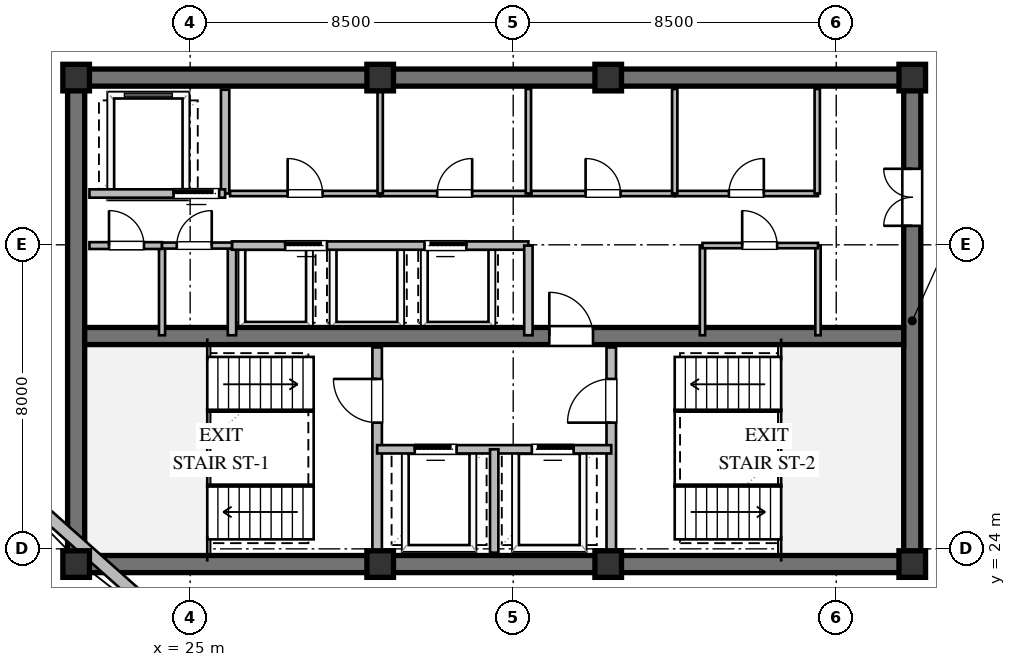
"""IFC4 building model, lengths in metres.
Left out: names, types, materials, properties, quantities, classifications, styles, units other than length and angle.
Written with IfcOpenShell. Run it as: python <this file> out.ifc"""

import sys

from ifc_helpers import new_model, si_unit, direction, frame, frame_2d, origin, origin_2d, place, context, subcontext, project, spatial, rectangle, extrude, element, fill, save


model = new_model("IFC4")
c1 = context("Model", 3, precision=1e-05, world=origin(), true_north=direction((0.0, 1.0)))
c2 = subcontext(c1, "Body", "Model", "MODEL_VIEW")
j1 = project(units=[si_unit("LENGTHUNIT", "METRE"), si_unit("PLANEANGLEUNIT", "RADIAN")], contexts=[c1])
p1 = place(None, origin())
s1 = spatial("IfcSite", under=j1, at=p1, CompositionType="ELEMENT")
p2 = place(p1, origin())
s2 = spatial("IfcBuilding", under=s1, at=p2, CompositionType="ELEMENT")
p3 = place(p2, frame((0.0, 0.0, 281.4)))
s3 = spatial("IfcBuildingStorey", under=s2, at=p3, CompositionType="ELEMENT", Elevation=281.4)
for number, where, z_axis, x_axis in (
    (1, (21.775, 23.6, 0.0), (0.0, 0.0, 1.0), (1.0, 0.0, 0.0)),
    (2, (21.775, 36.4, 0.0), (0.0, 0.0, 1.0), (1.0, 0.0, 0.0)),
):
    element("IfcWall", number, at=place(p3, frame(where, z_axis=z_axis, x_axis=x_axis)), inside=s3, PredefinedType="SHEAR", context=c2, shape_type="SweptSolid", body=[
        extrude(rectangle(XDim=22.45, YDim=0.45, at=frame_2d((11.225, 0.0))), origin(), (0.0, 0.0, 1.0), 3.56),
    ])
p4 = place(p3, frame((22.0, 23.825, 0.0), z_axis=(0.0, 0.0, 1.0), x_axis=(0.0, 1.0, 0.0)))
e3 = element("IfcWall", 3, at=p4, inside=s3, PredefinedType="SHEAR", context=c2, shape_type="SweptSolid", body=[
    extrude(rectangle(XDim=12.35, YDim=0.45, at=frame_2d((6.175, 0.0))), origin(), (0.0, 0.0, 1.0), 3.56),
])
p5 = place(p3, frame((44.0, 23.825, 0.0), z_axis=(0.0, 0.0, 1.0), x_axis=(0.0, 1.0, 0.0)))
e4 = element("IfcWall", 4, at=p5, inside=s3, PredefinedType="SHEAR", context=c2, shape_type="SweptSolid", body=[
    extrude(rectangle(XDim=12.35, YDim=0.45, at=frame_2d((6.175, 0.0))), origin(), (0.0, 0.0, 1.0), 3.56),
])
p6 = place(p5, frame((8.675, 0.0, 0.0)))
e5 = element("IfcOpeningElement", 5, at=p6, cuts=e4, PredefinedType="OPENING", context=c2, shape_type="SweptSolid", body=[
    extrude(rectangle(XDim=1.5, YDim=2.15, at=frame_2d((0.75, 1.075))), frame((0.0, 0.235, 0.0), z_axis=(0.0, -1.0, 0.0), x_axis=(1.0, 0.0, 0.0)), (0.0, 0.0, 1.0), 0.47),
])
p7 = place(p3, frame((22.225, 29.6, 0.0), z_axis=(0.0, 0.0, 1.0), x_axis=(1.0, 0.0, 0.0)))
e6 = element("IfcWall", 6, at=p7, inside=s3, PredefinedType="SHEAR", context=c2, shape_type="SweptSolid", body=[
    extrude(rectangle(XDim=21.55, YDim=0.45, at=frame_2d((10.775, 0.0))), origin(), (0.0, 0.0, 1.0), 3.56),
])
p8 = place(p7, frame((12.225, 0.0, 0.0)))
e7 = element("IfcOpeningElement", 7, at=p8, cuts=e6, PredefinedType="OPENING", context=c2, shape_type="SweptSolid", body=[
    extrude(rectangle(XDim=1.15, YDim=2.1, at=frame_2d((0.575, 1.05))), frame((0.0, 0.235, 0.0), z_axis=(0.0, -1.0, 0.0), x_axis=(1.0, 0.0, 0.0)), (0.0, 0.0, 1.0), 0.47),
])
for number, where, z_axis, x_axis in (
    (8, (22.0, 23.6, 0.0), (0.0, 0.0, 1.0), (1.0, 0.0, 0.0)),
    (9, (30.0, 23.6, 0.0), (0.0, 0.0, 1.0), (1.0, 0.0, 0.0)),
    (10, (36.0, 23.6, 0.0), (0.0, 0.0, 1.0), (1.0, 0.0, 0.0)),
    (11, (44.0, 23.6, 0.0), (0.0, 0.0, 1.0), (1.0, 0.0, 0.0)),
    (12, (44.0, 36.4, 0.0), (0.0, 0.0, 1.0), (1.0, 0.0, 0.0)),
    (13, (36.0, 36.4, 0.0), (0.0, 0.0, 1.0), (1.0, 0.0, 0.0)),
    (14, (30.0, 36.4, 0.0), (0.0, 0.0, 1.0), (1.0, 0.0, 0.0)),
    (15, (22.0, 36.4, 0.0), (0.0, 0.0, 1.0), (1.0, 0.0, 0.0)),
):
    element("IfcColumn", number, at=place(p3, frame(where, z_axis=z_axis, x_axis=x_axis)), inside=s3, PredefinedType="COLUMN", context=c2, shape_type="SweptSolid", body=[
        extrude(rectangle(XDim=0.7, YDim=0.7, at=origin_2d()), origin(), (0.0, 0.0, 1.0), 3.8),
    ])
p9 = place(p3, frame((24.648, 21.849, 0.0), z_axis=(0.0, 0.0, 1.0), x_axis=(-0.747068410291, 0.664747162721, 0.0)))
e16 = element("IfcWall", 16, at=p9, inside=s3, PredefinedType="STANDARD", context=c2, shape_type="SweptSolid", body=[
    extrude(rectangle(XDim=5.928, YDim=0.32, at=frame_2d((2.964, 0.0))), origin(), (0.0, 0.0, 1.0), 2.35),
])
p10 = place(p3, frame((29.92, 23.9, 0.0), z_axis=(0.0, 0.0, 1.0), x_axis=(0.0, 1.0, 0.0)))
e17 = element("IfcWall", 17, at=p10, inside=s3, PredefinedType="SOLIDWALL", context=c2, shape_type="SweptSolid", body=[
    extrude(rectangle(XDim=5.4, YDim=0.25, at=frame_2d((2.7, 0.0))), origin(), (0.0, 0.0, 1.0), 3.006),
])
p11 = place(p10, frame((3.421, 0.0, 0.0)))
e18 = element("IfcOpeningElement", 18, at=p11, cuts=e17, PredefinedType="OPENING", context=c2, shape_type="SweptSolid", body=[
    extrude(rectangle(XDim=1.15, YDim=2.1, at=frame_2d((0.575, 1.05))), frame((0.0, 0.135, 0.0), z_axis=(0.0, -1.0, 0.0), x_axis=(1.0, 0.0, 0.0)), (0.0, 0.0, 1.0), 0.27),
])
p12 = place(p3, frame((36.08, 23.9, 0.0), z_axis=(0.0, 0.0, 1.0), x_axis=(0.0, 1.0, 0.0)))
e19 = element("IfcWall", 19, at=p12, inside=s3, PredefinedType="SOLIDWALL", context=c2, shape_type="SweptSolid", body=[
    extrude(rectangle(XDim=5.4, YDim=0.25, at=frame_2d((2.7, 0.0))), origin(), (0.0, 0.0, 1.0), 3.56),
])
p13 = place(p12, frame((3.421, 0.0, 0.0)))
e20 = element("IfcOpeningElement", 20, at=p13, cuts=e19, PredefinedType="OPENING", context=c2, shape_type="SweptSolid", body=[
    extrude(rectangle(XDim=1.15, YDim=2.1, at=frame_2d((0.575, 1.05))), frame((0.0, 0.135, 0.0), z_axis=(0.0, -1.0, 0.0), x_axis=(1.0, 0.0, 0.0)), (0.0, 0.0, 1.0), 0.27),
])
p14 = place(p3, frame((29.92, 26.62, 0.0), z_axis=(0.0, 0.0, 1.0), x_axis=(1.0, 0.0, 0.0)))
e21 = element("IfcWall", 21, at=p14, inside=s3, PredefinedType="SOLIDWALL", context=c2, shape_type="SweptSolid", body=[
    extrude(rectangle(XDim=6.16, YDim=0.22, at=frame_2d((3.08, 0.0))), origin(), (0.0, 0.0, 1.0), 3.56),
])
p15 = place(p14, frame((0.99, 0.0, 0.0)))
e22 = element("IfcOpeningElement", 22, at=p15, cuts=e21, PredefinedType="OPENING", context=c2, shape_type="SweptSolid", body=[
    extrude(rectangle(XDim=1.1, YDim=2.1, at=frame_2d((0.55, 1.05))), frame((0.0, 0.12, 0.0), z_axis=(0.0, -1.0, 0.0), x_axis=(1.0, 0.0, 0.0)), (0.0, 0.0, 1.0), 0.24),
])
p16 = place(p14, frame((4.07, 0.0, 0.0)))
e23 = element("IfcOpeningElement", 23, at=p16, cuts=e21, PredefinedType="OPENING", context=c2, shape_type="SweptSolid", body=[
    extrude(rectangle(XDim=1.1, YDim=2.1, at=frame_2d((0.55, 1.05))), frame((0.0, 0.12, 0.0), z_axis=(0.0, -1.0, 0.0), x_axis=(1.0, 0.0, 0.0)), (0.0, 0.0, 1.0), 0.24),
])
p17 = place(p3, frame((33.0, 23.9, 0.0), z_axis=(0.0, 0.0, 1.0), x_axis=(0.0, 1.0, 0.0)))
e24 = element("IfcWall", 24, at=p17, inside=s3, PredefinedType="SOLIDWALL", context=c2, shape_type="SweptSolid", body=[
    extrude(rectangle(XDim=2.72, YDim=0.22, at=frame_2d((1.36, 0.0))), origin(), (0.0, 0.0, 1.0), 3.56),
])
p18 = place(p3, frame((25.92, 33.35, 0.0), z_axis=(0.0, 0.0, 1.0), x_axis=(0.0, 1.0, 0.0)))
e25 = element("IfcWall", 25, at=p18, inside=s3, PredefinedType="SOLIDWALL", context=c2, shape_type="SweptSolid", body=[
    extrude(rectangle(XDim=2.73, YDim=0.22, at=frame_2d((1.365, 0.0))), origin(), (0.0, 0.0, 1.0), 3.56),
])
p19 = place(p3, frame((22.35, 33.35, 0.0), z_axis=(0.0, 0.0, 1.0), x_axis=(1.0, 0.0, 0.0)))
e26 = element("IfcWall", 26, at=p19, inside=s3, PredefinedType="SOLIDWALL", context=c2, shape_type="SweptSolid", body=[
    extrude(rectangle(XDim=3.57, YDim=0.22, at=frame_2d((1.785, 0.0))), origin(), (0.0, 0.0, 1.0), 3.56),
])
p20 = place(p19, frame((2.213, 0.0, 0.0)))
e27 = element("IfcOpeningElement", 27, at=p20, cuts=e26, PredefinedType="OPENING", context=c2, shape_type="SweptSolid", body=[
    extrude(rectangle(XDim=1.2, YDim=2.1, at=frame_2d((0.6, 1.05))), frame((0.0, 0.12, 0.0), z_axis=(0.0, -1.0, 0.0), x_axis=(1.0, 0.0, 0.0)), (0.0, 0.0, 1.0), 0.24),
])
p21 = place(p3, frame((26.1, 29.62, 0.0), z_axis=(0.0, 0.0, 1.0), x_axis=(0.0, 1.0, 0.0)))
e28 = element("IfcWall", 28, at=p21, inside=s3, PredefinedType="SOLIDWALL", context=c2, shape_type="SweptSolid", body=[
    extrude(rectangle(XDim=2.36, YDim=0.22, at=frame_2d((1.18, 0.0))), origin(), (0.0, 0.0, 1.0), 3.56),
])
p22 = place(p3, frame((26.1, 31.98, 0.0), z_axis=(0.0, 0.0, 1.0), x_axis=(1.0, 0.0, 0.0)))
e29 = element("IfcWall", 29, at=p22, inside=s3, PredefinedType="SOLIDWALL", context=c2, shape_type="SweptSolid", body=[
    extrude(rectangle(XDim=7.8, YDim=0.22, at=frame_2d((3.9, 0.0))), origin(), (0.0, 0.0, 1.0), 3.56),
])
p23 = place(p22, frame((1.4, 0.0, 0.0)))
e30 = element("IfcOpeningElement", 30, at=p23, cuts=e29, PredefinedType="OPENING", context=c2, shape_type="SweptSolid", body=[
    extrude(rectangle(XDim=1.1, YDim=2.1, at=frame_2d((0.55, 1.05))), frame((0.0, 0.12, 0.0), z_axis=(0.0, -1.0, 0.0), x_axis=(1.0, 0.0, 0.0)), (0.0, 0.0, 1.0), 0.24),
])
p24 = place(p22, frame((5.066, 0.0, 0.0)))
e31 = element("IfcOpeningElement", 31, at=p24, cuts=e29, PredefinedType="OPENING", context=c2, shape_type="SweptSolid", body=[
    extrude(rectangle(XDim=1.1, YDim=2.1, at=frame_2d((0.55, 1.05))), frame((0.0, 0.12, 0.0), z_axis=(0.0, -1.0, 0.0), x_axis=(1.0, 0.0, 0.0)), (0.0, 0.0, 1.0), 0.24),
])
p25 = place(p3, frame((33.9, 29.62, 0.0), z_axis=(0.0, 0.0, 1.0), x_axis=(0.0, 1.0, 0.0)))
e32 = element("IfcWall", 32, at=p25, inside=s3, PredefinedType="SOLIDWALL", context=c2, shape_type="SweptSolid", body=[
    extrude(rectangle(XDim=2.36, YDim=0.22, at=frame_2d((1.18, 0.0))), origin(), (0.0, 0.0, 1.0), 3.56),
])
p26 = place(p3, frame((26.05, 33.35, 0.0), z_axis=(0.0, 0.0, 1.0), x_axis=(1.0, 0.0, 0.0)))
e33 = element("IfcWall", 33, at=p26, inside=s3, PredefinedType="PARTITIONING", context=c2, shape_type="SweptSolid", body=[
    extrude(rectangle(XDim=3.95, YDim=0.14, at=frame_2d((1.975, 0.0))), origin(), (0.0, 0.0, 1.0), 3.56),
])
p27 = place(p26, frame((1.515, 0.0, 0.0)))
e34 = element("IfcOpeningElement", 34, at=p27, cuts=e33, PredefinedType="OPENING", context=c2, shape_type="SweptSolid", body=[
    extrude(rectangle(XDim=0.92, YDim=2.1, at=frame_2d((0.46, 1.05))), frame((0.0, 0.08, 0.0), z_axis=(0.0, -1.0, 0.0), x_axis=(1.0, 0.0, 0.0)), (0.0, 0.0, 1.0), 0.16),
])
p28 = place(p3, frame((30.0, 33.35, 0.0), z_axis=(0.0, 0.0, 1.0), x_axis=(1.0, 0.0, 0.0)))
e35 = element("IfcWall", 35, at=p28, inside=s3, PredefinedType="PARTITIONING", context=c2, shape_type="SweptSolid", body=[
    extrude(rectangle(XDim=3.92, YDim=0.14, at=frame_2d((1.96, 0.0))), origin(), (0.0, 0.0, 1.0), 3.56),
])
p29 = place(p28, frame((1.5, 0.0, 0.0)))
e36 = element("IfcOpeningElement", 36, at=p29, cuts=e35, PredefinedType="OPENING", context=c2, shape_type="SweptSolid", body=[
    extrude(rectangle(XDim=0.92, YDim=2.1, at=frame_2d((0.46, 1.05))), frame((0.0, 0.08, 0.0), z_axis=(0.0, -1.0, 0.0), x_axis=(1.0, 0.0, 0.0)), (0.0, 0.0, 1.0), 0.16),
])
for number, where, z_axis, x_axis in (
    (37, (30.0, 33.35, 0.0), (0.0, 0.0, 1.0), (0.0, 1.0, 0.0)),
    (38, (33.9, 33.35, 0.0), (0.0, 0.0, 1.0), (0.0, 1.0, 0.0)),
):
    element("IfcWall", number, at=place(p3, frame(where, z_axis=z_axis, x_axis=x_axis)), inside=s3, PredefinedType="PARTITIONING", context=c2, shape_type="SweptSolid", body=[
        extrude(rectangle(XDim=2.75, YDim=0.14, at=frame_2d((1.375, 0.0))), origin(), (0.0, 0.0, 1.0), 3.56),
    ])
p30 = place(p3, frame((33.98, 33.35, 0.0), z_axis=(0.0, 0.0, 1.0), x_axis=(1.0, 0.0, 0.0)))
e39 = element("IfcWall", 39, at=p30, inside=s3, PredefinedType="PARTITIONING", context=c2, shape_type="SweptSolid", body=[
    extrude(rectangle(XDim=3.77, YDim=0.14, at=frame_2d((1.885, 0.0))), origin(), (0.0, 0.0, 1.0), 3.56),
])
p31 = place(p30, frame((1.425, 0.0, 0.0)))
e40 = element("IfcOpeningElement", 40, at=p31, cuts=e39, PredefinedType="OPENING", context=c2, shape_type="SweptSolid", body=[
    extrude(rectangle(XDim=0.92, YDim=2.1, at=frame_2d((0.46, 1.05))), frame((0.0, 0.08, 0.0), z_axis=(0.0, -1.0, 0.0), x_axis=(1.0, 0.0, 0.0)), (0.0, 0.0, 1.0), 0.16),
])
p32 = place(p3, frame((37.75, 33.35, 0.0), z_axis=(0.0, 0.0, 1.0), x_axis=(1.0, 0.0, 0.0)))
e41 = element("IfcWall", 41, at=p32, inside=s3, PredefinedType="PARTITIONING", context=c2, shape_type="SweptSolid", body=[
    extrude(rectangle(XDim=3.77, YDim=0.14, at=frame_2d((1.885, 0.0))), origin(), (0.0, 0.0, 1.0), 3.56),
])
p33 = place(p32, frame((1.425, 0.0, 0.0)))
e42 = element("IfcOpeningElement", 42, at=p33, cuts=e41, PredefinedType="OPENING", context=c2, shape_type="SweptSolid", body=[
    extrude(rectangle(XDim=0.92, YDim=2.1, at=frame_2d((0.46, 1.05))), frame((0.0, 0.08, 0.0), z_axis=(0.0, -1.0, 0.0), x_axis=(1.0, 0.0, 0.0)), (0.0, 0.0, 1.0), 0.16),
])
for number, where, z_axis, x_axis in (
    (43, (37.75, 33.35, 0.0), (0.0, 0.0, 1.0), (0.0, 1.0, 0.0)),
    (44, (41.5, 33.35, 0.0), (0.0, 0.0, 1.0), (0.0, 1.0, 0.0)),
):
    element("IfcWall", number, at=place(p3, frame(where, z_axis=z_axis, x_axis=x_axis)), inside=s3, PredefinedType="PARTITIONING", context=c2, shape_type="SweptSolid", body=[
        extrude(rectangle(XDim=2.75, YDim=0.14, at=frame_2d((1.375, 0.0))), origin(), (0.0, 0.0, 1.0), 3.56),
    ])
p34 = place(p3, frame((24.26, 29.62, 0.0), z_axis=(0.0, 0.0, 1.0), x_axis=(0.0, 1.0, 0.0)))
e45 = element("IfcWall", 45, at=p34, inside=s3, PredefinedType="PLUMBINGWALL", context=c2, shape_type="SweptSolid", body=[
    extrude(rectangle(XDim=2.36, YDim=0.16, at=frame_2d((1.18, 0.0))), origin(), (0.0, 0.0, 1.0), 3.56),
])
p35 = place(p3, frame((22.35, 31.98, 0.0), z_axis=(0.0, 0.0, 1.0), x_axis=(1.0, 0.0, 0.0)))
e46 = element("IfcWall", 46, at=p35, inside=s3, PredefinedType="PARTITIONING", context=c2, shape_type="SweptSolid", body=[
    extrude(rectangle(XDim=1.91, YDim=0.18, at=frame_2d((0.955, 0.0))), origin(), (0.0, 0.0, 1.0), 3.56),
])
p36 = place(p35, frame((0.515, 0.0, 0.0)))
e47 = element("IfcOpeningElement", 47, at=p36, cuts=e46, PredefinedType="OPENING", context=c2, shape_type="SweptSolid", body=[
    extrude(rectangle(XDim=0.92, YDim=2.1, at=frame_2d((0.46, 1.05))), frame((0.0, 0.1, 0.0), z_axis=(0.0, -1.0, 0.0), x_axis=(1.0, 0.0, 0.0)), (0.0, 0.0, 1.0), 0.2),
])
p37 = place(p3, frame((24.26, 31.98, 0.0), z_axis=(0.0, 0.0, 1.0), x_axis=(1.0, 0.0, 0.0)))
e48 = element("IfcWall", 48, at=p37, inside=s3, PredefinedType="PLUMBINGWALL", context=c2, shape_type="SweptSolid", body=[
    extrude(rectangle(XDim=1.84, YDim=0.16, at=frame_2d((0.92, 0.0))), origin(), (0.0, 0.0, 1.0), 3.56),
])
p38 = place(p37, frame((0.388, 0.0, 0.0)))
e49 = element("IfcOpeningElement", 49, at=p38, cuts=e48, PredefinedType="OPENING", context=c2, shape_type="SweptSolid", body=[
    extrude(rectangle(XDim=0.92, YDim=2.1, at=frame_2d((0.46, 1.05))), frame((0.0, 0.09, 0.0), z_axis=(0.0, -1.0, 0.0), x_axis=(1.0, 0.0, 0.0)), (0.0, 0.0, 1.0), 0.18),
])
for number, where, z_axis, x_axis in (
    (50, (38.48, 29.62, 0.0), (0.0, 0.0, 1.0), (0.0, 1.0, 0.0)),
    (51, (41.52, 29.62, 0.0), (0.0, 0.0, 1.0), (0.0, 1.0, 0.0)),
):
    element("IfcWall", number, at=place(p3, frame(where, z_axis=z_axis, x_axis=x_axis)), inside=s3, PredefinedType="PARTITIONING", context=c2, shape_type="SweptSolid", body=[
        extrude(rectangle(XDim=2.36, YDim=0.14, at=frame_2d((1.18, 0.0))), origin(), (0.0, 0.0, 1.0), 3.56),
    ])
p39 = place(p3, frame((38.48, 31.98, 0.0), z_axis=(0.0, 0.0, 1.0), x_axis=(1.0, 0.0, 0.0)))
e52 = element("IfcWall", 52, at=p39, inside=s3, PredefinedType="PARTITIONING", context=c2, shape_type="SweptSolid", body=[
    extrude(rectangle(XDim=3.04, YDim=0.14, at=frame_2d((1.52, 0.0))), origin(), (0.0, 0.0, 1.0), 3.56),
])
p40 = place(p39, frame((1.045, 0.0, 0.0)))
e53 = element("IfcOpeningElement", 53, at=p40, cuts=e52, PredefinedType="OPENING", context=c2, shape_type="SweptSolid", body=[
    extrude(rectangle(XDim=0.92, YDim=2.1, at=frame_2d((0.46, 1.05))), frame((0.0, 0.08, 0.0), z_axis=(0.0, -1.0, 0.0), x_axis=(1.0, 0.0, 0.0)), (0.0, 0.0, 1.0), 0.16),
])
p41 = place(p11, origin())
e54 = element("IfcDoor", 54, at=p41, inside=s3, OperationType="SINGLE_SWING_RIGHT", PredefinedType="DOOR", context=c2, shape_type="SweptSolid", body=[
    extrude(rectangle(XDim=1.15, YDim=2.1, at=frame_2d((0.575, 1.05))), frame((0.0, 0.025, 0.0), z_axis=(0.0, -1.0, 0.0), x_axis=(1.0, 0.0, 0.0)), (0.0, 0.0, 1.0), 0.05),
])
fill(e18, e54)
p42 = place(p13, origin())
e55 = element("IfcDoor", 55, at=p42, inside=s3, OperationType="SINGLE_SWING_LEFT", PredefinedType="DOOR", context=c2, shape_type="SweptSolid", body=[
    extrude(rectangle(XDim=1.15, YDim=2.1, at=frame_2d((0.575, 1.05))), frame((0.0, 0.025, 0.0), z_axis=(0.0, -1.0, 0.0), x_axis=(1.0, 0.0, 0.0)), (0.0, 0.0, 1.0), 0.05),
])
fill(e20, e55)
p43 = place(p15, origin())
e56 = element("IfcDoor", 56, at=p43, inside=s3, OperationType="SLIDING_TO_LEFT", PredefinedType="DOOR", context=c2, shape_type="SweptSolid", body=[
    extrude(rectangle(XDim=1.1, YDim=2.1, at=frame_2d((0.55, 1.05))), frame((0.0, 0.025, 0.0), z_axis=(0.0, -1.0, 0.0), x_axis=(1.0, 0.0, 0.0)), (0.0, 0.0, 1.0), 0.05),
])
fill(e22, e56)
p44 = place(p16, origin())
e57 = element("IfcDoor", 57, at=p44, inside=s3, OperationType="SLIDING_TO_RIGHT", PredefinedType="DOOR", context=c2, shape_type="SweptSolid", body=[
    extrude(rectangle(XDim=1.1, YDim=2.1, at=frame_2d((0.55, 1.05))), frame((0.0, 0.025, 0.0), z_axis=(0.0, -1.0, 0.0), x_axis=(1.0, 0.0, 0.0)), (0.0, 0.0, 1.0), 0.05),
])
fill(e23, e57)
p45 = place(p8, origin())
e58 = element("IfcDoor", 58, at=p45, inside=s3, OperationType="SINGLE_SWING_LEFT", PredefinedType="DOOR", context=c2, shape_type="SweptSolid", body=[
    extrude(rectangle(XDim=1.15, YDim=2.1, at=frame_2d((0.575, 1.05))), frame((0.0, 0.025, 0.0), z_axis=(0.0, -1.0, 0.0), x_axis=(1.0, 0.0, 0.0)), (0.0, 0.0, 1.0), 0.05),
])
fill(e7, e58)
p46 = place(p6, origin())
e59 = element("IfcDoor", 59, at=p46, inside=s3, OperationType="DOUBLE_DOOR_SINGLE_SWING", PredefinedType="DOOR", context=c2, shape_type="SweptSolid", body=[
    extrude(rectangle(XDim=1.5, YDim=2.15, at=frame_2d((0.75, 1.075))), frame((0.0, 0.025, 0.0), z_axis=(0.0, -1.0, 0.0), x_axis=(1.0, 0.0, 0.0)), (0.0, 0.0, 1.0), 0.05),
])
fill(e5, e59)
p47 = place(p20, origin())
e60 = element("IfcDoor", 60, at=p47, inside=s3, OperationType="SLIDING_TO_LEFT", PredefinedType="DOOR", context=c2, shape_type="SweptSolid", body=[
    extrude(rectangle(XDim=1.2, YDim=2.1, at=frame_2d((0.6, 1.05))), frame((0.0, 0.025, 0.0), z_axis=(0.0, -1.0, 0.0), x_axis=(1.0, 0.0, 0.0)), (0.0, 0.0, 1.0), 0.05),
])
fill(e27, e60)
p48 = place(p23, origin())
e61 = element("IfcDoor", 61, at=p48, inside=s3, OperationType="SLIDING_TO_LEFT", PredefinedType="DOOR", context=c2, shape_type="SweptSolid", body=[
    extrude(rectangle(XDim=1.1, YDim=2.1, at=frame_2d((0.55, 1.05))), frame((0.0, 0.025, 0.0), z_axis=(0.0, -1.0, 0.0), x_axis=(1.0, 0.0, 0.0)), (0.0, 0.0, 1.0), 0.05),
])
fill(e30, e61)
p49 = place(p24, origin())
e62 = element("IfcDoor", 62, at=p49, inside=s3, OperationType="SLIDING_TO_RIGHT", PredefinedType="DOOR", context=c2, shape_type="SweptSolid", body=[
    extrude(rectangle(XDim=1.1, YDim=2.1, at=frame_2d((0.55, 1.05))), frame((0.0, 0.025, 0.0), z_axis=(0.0, -1.0, 0.0), x_axis=(1.0, 0.0, 0.0)), (0.0, 0.0, 1.0), 0.05),
])
fill(e31, e62)
p50 = place(p27, origin())
e63 = element("IfcDoor", 63, at=p50, inside=s3, OperationType="SINGLE_SWING_LEFT", PredefinedType="DOOR", context=c2, shape_type="SweptSolid", body=[
    extrude(rectangle(XDim=0.92, YDim=2.1, at=frame_2d((0.46, 1.05))), frame((0.0, 0.025, 0.0), z_axis=(0.0, -1.0, 0.0), x_axis=(1.0, 0.0, 0.0)), (0.0, 0.0, 1.0), 0.05),
])
fill(e34, e63)
p51 = place(p29, origin())
e64 = element("IfcDoor", 64, at=p51, inside=s3, OperationType="SINGLE_SWING_RIGHT", PredefinedType="DOOR", context=c2, shape_type="SweptSolid", body=[
    extrude(rectangle(XDim=0.92, YDim=2.1, at=frame_2d((0.46, 1.05))), frame((0.0, 0.025, 0.0), z_axis=(0.0, -1.0, 0.0), x_axis=(1.0, 0.0, 0.0)), (0.0, 0.0, 1.0), 0.05),
])
fill(e36, e64)
p52 = place(p31, origin())
e65 = element("IfcDoor", 65, at=p52, inside=s3, OperationType="SINGLE_SWING_LEFT", PredefinedType="DOOR", context=c2, shape_type="SweptSolid", body=[
    extrude(rectangle(XDim=0.92, YDim=2.1, at=frame_2d((0.46, 1.05))), frame((0.0, 0.025, 0.0), z_axis=(0.0, -1.0, 0.0), x_axis=(1.0, 0.0, 0.0)), (0.0, 0.0, 1.0), 0.05),
])
fill(e40, e65)
p53 = place(p33, origin())
e66 = element("IfcDoor", 66, at=p53, inside=s3, OperationType="SINGLE_SWING_RIGHT", PredefinedType="DOOR", context=c2, shape_type="SweptSolid", body=[
    extrude(rectangle(XDim=0.92, YDim=2.1, at=frame_2d((0.46, 1.05))), frame((0.0, 0.025, 0.0), z_axis=(0.0, -1.0, 0.0), x_axis=(1.0, 0.0, 0.0)), (0.0, 0.0, 1.0), 0.05),
])
fill(e42, e66)
p54 = place(p36, origin())
e67 = element("IfcDoor", 67, at=p54, inside=s3, OperationType="SINGLE_SWING_LEFT", PredefinedType="DOOR", context=c2, shape_type="SweptSolid", body=[
    extrude(rectangle(XDim=0.92, YDim=2.1, at=frame_2d((0.46, 1.05))), frame((0.0, 0.025, 0.0), z_axis=(0.0, -1.0, 0.0), x_axis=(1.0, 0.0, 0.0)), (0.0, 0.0, 1.0), 0.05),
])
fill(e47, e67)
p55 = place(p38, origin())
e68 = element("IfcDoor", 68, at=p55, inside=s3, OperationType="SINGLE_SWING_RIGHT", PredefinedType="DOOR", context=c2, shape_type="SweptSolid", body=[
    extrude(rectangle(XDim=0.92, YDim=2.1, at=frame_2d((0.46, 1.05))), frame((0.0, 0.025, 0.0), z_axis=(0.0, -1.0, 0.0), x_axis=(1.0, 0.0, 0.0)), (0.0, 0.0, 1.0), 0.05),
])
fill(e49, e68)
p56 = place(p40, origin())
e69 = element("IfcDoor", 69, at=p56, inside=s3, OperationType="SINGLE_SWING_LEFT", PredefinedType="DOOR", context=c2, shape_type="SweptSolid", body=[
    extrude(rectangle(XDim=0.92, YDim=2.1, at=frame_2d((0.46, 1.05))), frame((0.0, 0.025, 0.0), z_axis=(0.0, -1.0, 0.0), x_axis=(1.0, 0.0, 0.0)), (0.0, 0.0, 1.0), 0.05),
])
fill(e53, e69)
save(model, sys.argv[1])
